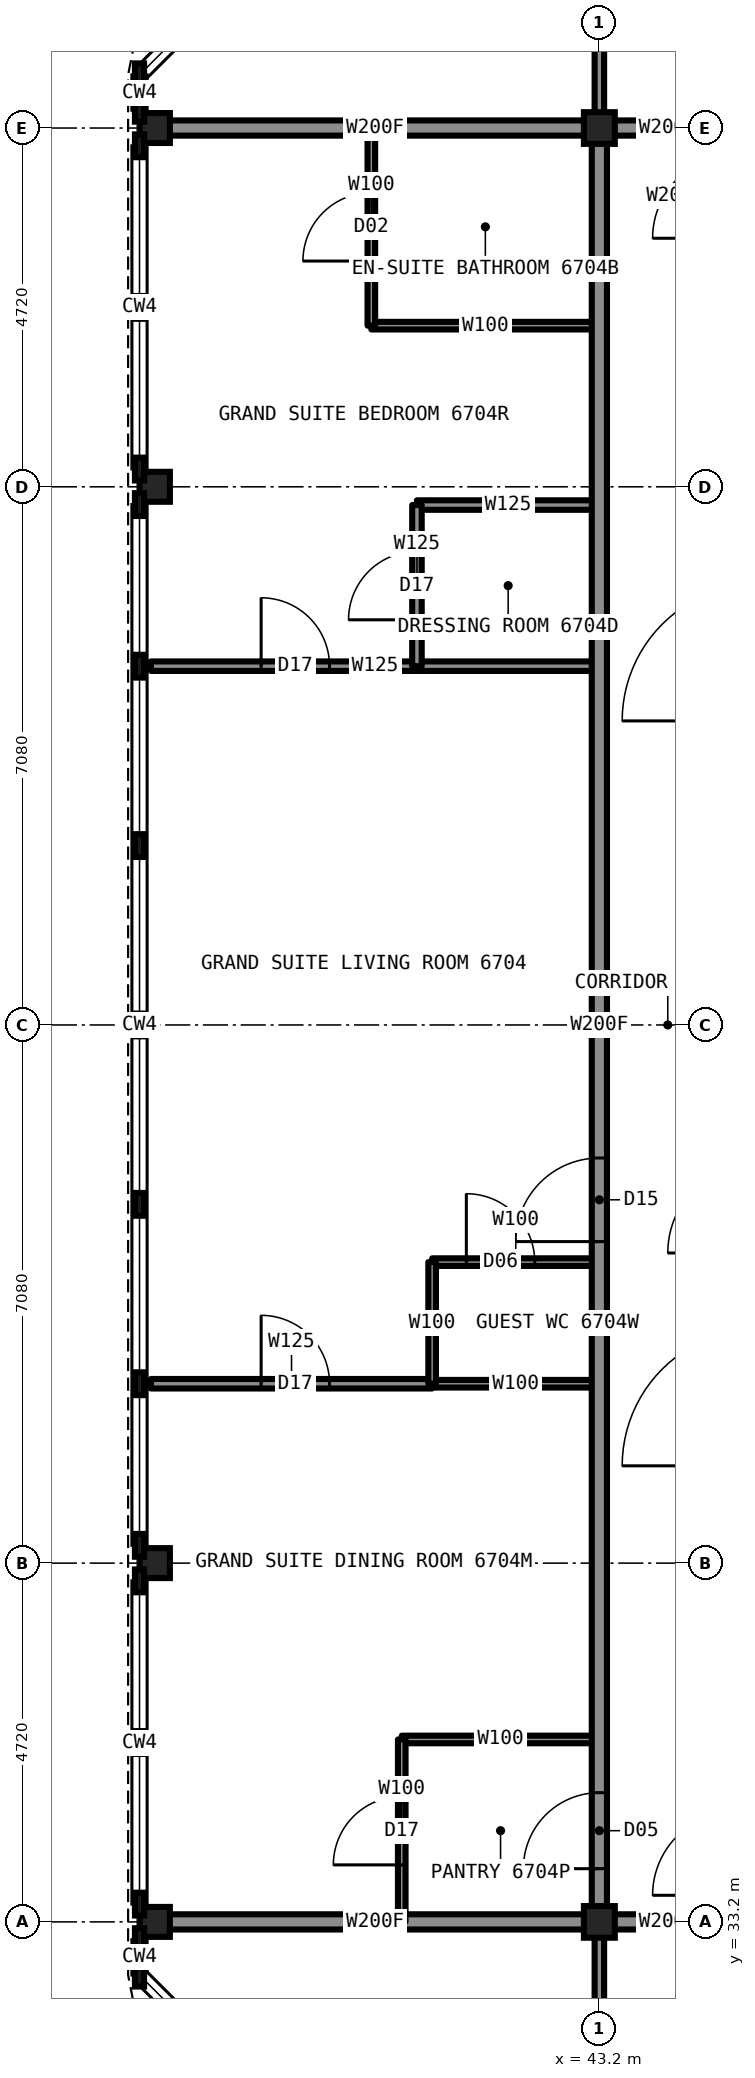
"""IFC4 building model, lengths in metres.
Left out: names, types, materials, properties, quantities, classifications, styles, units other than length and angle.
Written with IfcOpenShell. Run it as: python <this file> out.ifc"""

import sys

from ifc_helpers import new_model, si_unit, direction, frame, frame_2d, origin, origin_2d, place, context, subcontext, project, spatial, rectangle, i_section, extrude, element, fill, save


model = new_model("IFC4")
c1 = context("Model", 3, precision=1e-05, world=origin(), true_north=direction((0.0, 1.0)))
c2 = subcontext(c1, "Body", "Model", "MODEL_VIEW")
j1 = project(units=[si_unit("LENGTHUNIT", "METRE"), si_unit("PLANEANGLEUNIT", "RADIAN")], contexts=[c1])
p1 = place(None, origin())
s1 = spatial("IfcSite", under=j1, at=p1, CompositionType="ELEMENT")
p2 = place(p1, origin())
s2 = spatial("IfcBuilding", under=s1, at=p2, CompositionType="ELEMENT")
p3 = place(p2, frame((0.0, 0.0, 247.7)))
s3 = spatial("IfcBuildingStorey", under=s2, at=p3, CompositionType="ELEMENT", Elevation=247.7)
for number, where, z_axis, x_axis in (
    (1, (37.35, 33.2, 0.0), (0.0, 0.0, 1.0), (1.0, 0.0, 0.0)),
    (2, (37.35, 37.92, 0.0), (0.0, 0.0, 1.0), (1.0, 0.0, 0.0)),
    (3, (37.35, 52.08, 0.0), (0.0, 0.0, 1.0), (1.0, 0.0, 0.0)),
    (4, (37.35, 56.8, 0.0), (0.0, 0.0, 1.0), (1.0, 0.0, 0.0)),
):
    element("IfcColumn", number, at=place(p3, frame(where, z_axis=z_axis, x_axis=x_axis)), inside=s3, PredefinedType="COLUMN", context=c2, shape_type="SweptSolid", body=[
        extrude(i_section(OverallWidth=0.399, OverallDepth=0.394, WebThickness=0.023, FlangeThickness=0.037, at=origin_2d()), origin(), (0.0, 0.0, 1.0), 3.5),
    ])
for number, where, z_axis, x_axis in (
    (5, (43.2, 33.2, 0.0), (0.0, 0.0, 1.0), (1.0, 0.0, 0.0)),
    (6, (43.2, 56.8, 0.0), (0.0, 0.0, 1.0), (1.0, 0.0, 0.0)),
):
    element("IfcColumn", number, at=place(p3, frame(where, z_axis=z_axis, x_axis=x_axis)), inside=s3, PredefinedType="COLUMN", context=c2, shape_type="SweptSolid", body=[
        extrude(i_section(OverallWidth=0.406, OverallDepth=0.417, WebThickness=0.03, FlangeThickness=0.048, at=origin_2d()), origin(), (0.0, 0.0, 1.0), 3.5),
    ])
p4 = place(p3, frame((43.2, 33.2, 0.0), z_axis=(0.0, 0.0, 1.0), x_axis=(1.0, 0.0, 0.0)))
e7 = element("IfcWall", 7, at=p4, inside=s3, PredefinedType="PARTITIONING", context=c2, shape_type="SweptSolid", body=[
    extrude(rectangle(XDim=1.8, YDim=0.2, at=frame_2d((0.9, 0.0))), origin(), (0.0, 0.0, 1.0), 3.33),
])
p5 = place(p3, frame((37.3, 33.2, 0.0), z_axis=(0.0, 0.0, 1.0), x_axis=(1.0, 0.0, 0.0)))
e8 = element("IfcWall", 8, at=p5, inside=s3, PredefinedType="PARTITIONING", context=c2, shape_type="SweptSolid", body=[
    extrude(rectangle(XDim=5.9, YDim=0.2, at=frame_2d((2.95, 0.0))), origin(), (0.0, 0.0, 1.0), 2.573),
])
p6 = place(p3, frame((41.0, 41.88, 0.0), z_axis=(0.0, 0.0, 1.0), x_axis=(1.0, 0.0, 0.0)))
e9 = element("IfcWall", 9, at=p6, inside=s3, PredefinedType="PARTITIONING", context=c2, shape_type="SweptSolid", body=[
    extrude(rectangle(XDim=2.2, YDim=0.1, at=frame_2d((1.1, 0.0))), origin(), (0.0, 0.0, 1.0), 3.33),
])
p7 = place(p6, frame((0.45, 0.0, 0.0)))
e10 = element("IfcOpeningElement", 10, at=p7, cuts=e9, PredefinedType="OPENING", context=c2, shape_type="SweptSolid", body=[
    extrude(rectangle(XDim=0.9, YDim=2.1, at=frame_2d((0.45, 1.05))), frame((0.0, 0.06, 0.0), z_axis=(0.0, -1.0, 0.0), x_axis=(1.0, 0.0, 0.0)), (0.0, 0.0, 1.0), 0.12),
])
p8 = place(p3, frame((41.0, 40.28, 0.0), z_axis=(0.0, 0.0, 1.0), x_axis=(1.0, 0.0, 0.0)))
e11 = element("IfcWall", 11, at=p8, inside=s3, PredefinedType="PARTITIONING", context=c2, shape_type="SweptSolid", body=[
    extrude(rectangle(XDim=2.2, YDim=0.1, at=frame_2d((1.1, 0.0))), origin(), (0.0, 0.0, 1.0), 2.797),
])
p9 = place(p3, frame((37.3, 40.28, 0.0), z_axis=(0.0, 0.0, 1.0), x_axis=(1.0, 0.0, 0.0)))
e12 = element("IfcWall", 12, at=p9, inside=s3, PredefinedType="PARTITIONING", context=c2, shape_type="SweptSolid", body=[
    extrude(rectangle(XDim=3.7, YDim=0.125, at=frame_2d((1.85, 0.0))), origin(), (0.0, 0.0, 1.0), 2.797),
])
p10 = place(p9, frame((1.45, 0.0, 0.0)))
e13 = element("IfcOpeningElement", 13, at=p10, cuts=e12, PredefinedType="OPENING", context=c2, shape_type="SweptSolid", body=[
    extrude(rectangle(XDim=0.9, YDim=2.2, at=frame_2d((0.45, 1.1))), frame((0.0, 0.073, 0.0), z_axis=(0.0, -1.0, 0.0), x_axis=(1.0, 0.0, 0.0)), (0.0, 0.0, 1.0), 0.145),
])
p11 = place(p3, frame((40.6, 35.6, 0.0), z_axis=(0.0, 0.0, 1.0), x_axis=(1.0, 0.0, 0.0)))
e14 = element("IfcWall", 14, at=p11, inside=s3, PredefinedType="PARTITIONING", context=c2, shape_type="SweptSolid", body=[
    extrude(rectangle(XDim=2.6, YDim=0.1, at=frame_2d((1.3, 0.0))), origin(), (0.0, 0.0, 1.0), 2.797),
])
p12 = place(p3, frame((43.2, 56.8, 0.0), z_axis=(0.0, 0.0, 1.0), x_axis=(1.0, 0.0, 0.0)))
e15 = element("IfcWall", 15, at=p12, inside=s3, PredefinedType="PARTITIONING", context=c2, shape_type="SweptSolid", body=[
    extrude(rectangle(XDim=1.8, YDim=0.2, at=frame_2d((0.9, 0.0))), origin(), (0.0, 0.0, 1.0), 3.33),
])
p13 = place(p3, frame((37.3, 56.8, 0.0), z_axis=(0.0, 0.0, 1.0), x_axis=(1.0, 0.0, 0.0)))
e16 = element("IfcWall", 16, at=p13, inside=s3, PredefinedType="PARTITIONING", context=c2, shape_type="SweptSolid", body=[
    extrude(rectangle(XDim=5.9, YDim=0.2, at=frame_2d((2.95, 0.0))), origin(), (0.0, 0.0, 1.0), 2.573),
])
p14 = place(p3, frame((37.3, 49.72, 0.0), z_axis=(0.0, 0.0, 1.0), x_axis=(1.0, 0.0, 0.0)))
e17 = element("IfcWall", 17, at=p14, inside=s3, PredefinedType="PARTITIONING", context=c2, shape_type="SweptSolid", body=[
    extrude(rectangle(XDim=5.9, YDim=0.125, at=frame_2d((2.95, 0.0))), origin(), (0.0, 0.0, 1.0), 2.797),
])
p15 = place(p14, frame((1.45, 0.0, 0.0)))
e18 = element("IfcOpeningElement", 18, at=p15, cuts=e17, PredefinedType="OPENING", context=c2, shape_type="SweptSolid", body=[
    extrude(rectangle(XDim=0.9, YDim=2.2, at=frame_2d((0.45, 1.1))), frame((0.0, 0.073, 0.0), z_axis=(0.0, -1.0, 0.0), x_axis=(1.0, 0.0, 0.0)), (0.0, 0.0, 1.0), 0.145),
])
p16 = place(p3, frame((40.8, 51.84, 0.0), z_axis=(0.0, 0.0, 1.0), x_axis=(1.0, 0.0, 0.0)))
e19 = element("IfcWall", 19, at=p16, inside=s3, PredefinedType="PARTITIONING", context=c2, shape_type="SweptSolid", body=[
    extrude(rectangle(XDim=2.4, YDim=0.125, at=frame_2d((1.2, 0.0))), origin(), (0.0, 0.0, 1.0), 3.33),
])
p17 = place(p3, frame((40.2, 54.2, 0.0), z_axis=(0.0, 0.0, 1.0), x_axis=(1.0, 0.0, 0.0)))
e20 = element("IfcWall", 20, at=p17, inside=s3, PredefinedType="PARTITIONING", context=c2, shape_type="SweptSolid", body=[
    extrude(rectangle(XDim=3.0, YDim=0.1, at=frame_2d((1.5, 0.0))), origin(), (0.0, 0.0, 1.0), 3.33),
])
p18 = place(p3, frame((43.2, 33.2, 0.0), z_axis=(0.0, 0.0, 1.0), x_axis=(0.0, 1.0, 0.0)))
e21 = element("IfcWall", 21, at=p18, inside=s3, PredefinedType="PARTITIONING", context=c2, shape_type="SweptSolid", body=[
    extrude(rectangle(XDim=23.6, YDim=0.2, at=frame_2d((11.8, 0.0))), origin(), (0.0, 0.0, 1.0), 3.33),
])
p19 = place(p18, frame((8.95, 0.0, 0.0)))
e22 = element("IfcOpeningElement", 22, at=p19, cuts=e21, PredefinedType="OPENING", context=c2, shape_type="SweptSolid", body=[
    extrude(rectangle(XDim=1.1, YDim=2.2, at=frame_2d((0.55, 1.1))), frame((0.0, 0.11, 0.0), z_axis=(0.0, -1.0, 0.0), x_axis=(1.0, 0.0, 0.0)), (0.0, 0.0, 1.0), 0.22),
])
p20 = place(p18, frame((0.7, 0.0, 0.0)))
e23 = element("IfcOpeningElement", 23, at=p20, cuts=e21, PredefinedType="OPENING", context=c2, shape_type="SweptSolid", body=[
    extrude(rectangle(XDim=1.0, YDim=2.1, at=frame_2d((0.5, 1.05))), frame((0.0, 0.11, 0.0), z_axis=(0.0, -1.0, 0.0), x_axis=(1.0, 0.0, 0.0)), (0.0, 0.0, 1.0), 0.22),
])
p21 = place(p3, frame((43.2, 27.3, 0.0), z_axis=(0.0, 0.0, 1.0), x_axis=(0.0, 1.0, 0.0)))
e24 = element("IfcWall", 24, at=p21, inside=s3, PredefinedType="PARTITIONING", context=c2, shape_type="SweptSolid", body=[
    extrude(rectangle(XDim=5.9, YDim=0.125, at=frame_2d((2.95, 0.0))), origin(), (0.0, 0.0, 1.0), 2.573),
])
p22 = place(p21, frame((1.45, 0.0, 0.0)))
e25 = element("IfcOpeningElement", 25, at=p22, cuts=e24, PredefinedType="OPENING", context=c2, shape_type="SweptSolid", body=[
    extrude(rectangle(XDim=0.9, YDim=2.2, at=frame_2d((0.45, 1.1))), frame((0.0, 0.073, 0.0), z_axis=(0.0, -1.0, 0.0), x_axis=(1.0, 0.0, 0.0)), (0.0, 0.0, 1.0), 0.145),
])
p23 = place(p3, frame((43.2, 56.8, 0.0), z_axis=(0.0, 0.0, 1.0), x_axis=(0.0, 1.0, 0.0)))
e26 = element("IfcWall", 26, at=p23, inside=s3, PredefinedType="PARTITIONING", context=c2, shape_type="SweptSolid", body=[
    extrude(rectangle(XDim=5.9, YDim=0.125, at=frame_2d((2.95, 0.0))), origin(), (0.0, 0.0, 1.0), 2.573),
])
p24 = place(p23, frame((3.55, 0.0, 0.0)))
e27 = element("IfcOpeningElement", 27, at=p24, cuts=e26, PredefinedType="OPENING", context=c2, shape_type="SweptSolid", body=[
    extrude(rectangle(XDim=0.9, YDim=2.2, at=frame_2d((0.45, 1.1))), frame((0.0, 0.073, 0.0), z_axis=(0.0, -1.0, 0.0), x_axis=(1.0, 0.0, 0.0)), (0.0, 0.0, 1.0), 0.145),
])
p25 = place(p3, frame((41.0, 40.28, 0.0), z_axis=(0.0, 0.0, 1.0), x_axis=(0.0, 1.0, 0.0)))
e28 = element("IfcWall", 28, at=p25, inside=s3, PredefinedType="PARTITIONING", context=c2, shape_type="SweptSolid", body=[
    extrude(rectangle(XDim=1.6, YDim=0.1, at=frame_2d((0.8, 0.0))), origin(), (0.0, 0.0, 1.0), 3.33),
])
p26 = place(p3, frame((40.8, 49.72, 0.0), z_axis=(0.0, 0.0, 1.0), x_axis=(0.0, 1.0, 0.0)))
e29 = element("IfcWall", 29, at=p26, inside=s3, PredefinedType="PARTITIONING", context=c2, shape_type="SweptSolid", body=[
    extrude(rectangle(XDim=2.12, YDim=0.125, at=frame_2d((1.06, 0.0))), origin(), (0.0, 0.0, 1.0), 3.33),
])
p27 = place(p26, frame((0.61, 0.0, 0.0)))
e30 = element("IfcOpeningElement", 30, at=p27, cuts=e29, PredefinedType="OPENING", context=c2, shape_type="SweptSolid", body=[
    extrude(rectangle(XDim=0.9, YDim=2.2, at=frame_2d((0.45, 1.1))), frame((0.0, 0.073, 0.0), z_axis=(0.0, -1.0, 0.0), x_axis=(1.0, 0.0, 0.0)), (0.0, 0.0, 1.0), 0.145),
])
p28 = place(p3, frame((40.6, 33.2, 0.0), z_axis=(0.0, 0.0, 1.0), x_axis=(0.0, 1.0, 0.0)))
e31 = element("IfcWall", 31, at=p28, inside=s3, PredefinedType="PARTITIONING", context=c2, shape_type="SweptSolid", body=[
    extrude(rectangle(XDim=2.4, YDim=0.1, at=frame_2d((1.2, 0.0))), origin(), (0.0, 0.0, 1.0), 3.33),
])
p29 = place(p28, frame((0.75, 0.0, 0.0)))
e32 = element("IfcOpeningElement", 32, at=p29, cuts=e31, PredefinedType="OPENING", context=c2, shape_type="SweptSolid", body=[
    extrude(rectangle(XDim=0.9, YDim=2.2, at=frame_2d((0.45, 1.1))), frame((0.0, 0.06, 0.0), z_axis=(0.0, -1.0, 0.0), x_axis=(1.0, 0.0, 0.0)), (0.0, 0.0, 1.0), 0.12),
])
p30 = place(p3, frame((40.2, 54.2, 0.0), z_axis=(0.0, 0.0, 1.0), x_axis=(0.0, 1.0, 0.0)))
e33 = element("IfcWall", 33, at=p30, inside=s3, PredefinedType="PARTITIONING", context=c2, shape_type="SweptSolid", body=[
    extrude(rectangle(XDim=2.6, YDim=0.1, at=frame_2d((1.3, 0.0))), origin(), (0.0, 0.0, 1.0), 3.33),
])
p31 = place(p30, frame((0.85, 0.0, 0.0)))
e34 = element("IfcOpeningElement", 34, at=p31, cuts=e33, PredefinedType="OPENING", context=c2, shape_type="SweptSolid", body=[
    extrude(rectangle(XDim=0.9, YDim=2.1, at=frame_2d((0.45, 1.05))), frame((0.0, 0.06, 0.0), z_axis=(0.0, -1.0, 0.0), x_axis=(1.0, 0.0, 0.0)), (0.0, 0.0, 1.0), 0.12),
])
p32 = place(p19, origin())
e35 = element("IfcDoor", 35, at=p32, inside=s3, OperationType="SINGLE_SWING_LEFT", PredefinedType="DOOR", context=c2, shape_type="SweptSolid", body=[
    extrude(rectangle(XDim=1.1, YDim=2.2, at=frame_2d((0.55, 1.1))), frame((0.0, 0.025, 0.0), z_axis=(0.0, -1.0, 0.0), x_axis=(1.0, 0.0, 0.0)), (0.0, 0.0, 1.0), 0.05),
])
fill(e22, e35)
p33 = place(p31, origin())
e36 = element("IfcDoor", 36, at=p33, inside=s3, OperationType="SINGLE_SWING_RIGHT", PredefinedType="DOOR", context=c2, shape_type="SweptSolid", body=[
    extrude(rectangle(XDim=0.9, YDim=2.1, at=frame_2d((0.45, 1.05))), frame((0.0, 0.025, 0.0), z_axis=(0.0, -1.0, 0.0), x_axis=(1.0, 0.0, 0.0)), (0.0, 0.0, 1.0), 0.05),
])
fill(e34, e36)
p34 = place(p27, origin())
e37 = element("IfcDoor", 37, at=p34, inside=s3, OperationType="SINGLE_SWING_LEFT", PredefinedType="DOOR", context=c2, shape_type="SweptSolid", body=[
    extrude(rectangle(XDim=0.9, YDim=2.2, at=frame_2d((0.45, 1.1))), frame((0.0, 0.025, 0.0), z_axis=(0.0, -1.0, 0.0), x_axis=(1.0, 0.0, 0.0)), (0.0, 0.0, 1.0), 0.05),
])
fill(e30, e37)
p35 = place(p10, origin())
e38 = element("IfcDoor", 38, at=p35, inside=s3, OperationType="SINGLE_SWING_LEFT", PredefinedType="DOOR", context=c2, shape_type="SweptSolid", body=[
    extrude(rectangle(XDim=0.9, YDim=2.2, at=frame_2d((0.45, 1.1))), frame((0.0, 0.025, 0.0), z_axis=(0.0, -1.0, 0.0), x_axis=(1.0, 0.0, 0.0)), (0.0, 0.0, 1.0), 0.05),
])
fill(e13, e38)
p36 = place(p29, origin())
e39 = element("IfcDoor", 39, at=p36, inside=s3, OperationType="SINGLE_SWING_LEFT", PredefinedType="DOOR", context=c2, shape_type="SweptSolid", body=[
    extrude(rectangle(XDim=0.9, YDim=2.2, at=frame_2d((0.45, 1.1))), frame((0.0, 0.025, 0.0), z_axis=(0.0, -1.0, 0.0), x_axis=(1.0, 0.0, 0.0)), (0.0, 0.0, 1.0), 0.05),
])
fill(e32, e39)
p37 = place(p20, origin())
e40 = element("IfcDoor", 40, at=p37, inside=s3, OperationType="SINGLE_SWING_LEFT", PredefinedType="DOOR", context=c2, shape_type="SweptSolid", body=[
    extrude(rectangle(XDim=1.0, YDim=2.1, at=frame_2d((0.5, 1.05))), frame((0.0, 0.025, 0.0), z_axis=(0.0, -1.0, 0.0), x_axis=(1.0, 0.0, 0.0)), (0.0, 0.0, 1.0), 0.05),
])
fill(e23, e40)
p38 = place(p15, origin())
e41 = element("IfcDoor", 41, at=p38, inside=s3, OperationType="SINGLE_SWING_LEFT", PredefinedType="DOOR", context=c2, shape_type="SweptSolid", body=[
    extrude(rectangle(XDim=0.9, YDim=2.2, at=frame_2d((0.45, 1.1))), frame((0.0, 0.025, 0.0), z_axis=(0.0, -1.0, 0.0), x_axis=(1.0, 0.0, 0.0)), (0.0, 0.0, 1.0), 0.05),
])
fill(e18, e41)
p39 = place(p7, origin())
e42 = element("IfcDoor", 42, at=p39, inside=s3, OperationType="SINGLE_SWING_LEFT", PredefinedType="DOOR", context=c2, shape_type="SweptSolid", body=[
    extrude(rectangle(XDim=0.9, YDim=2.1, at=frame_2d((0.45, 1.05))), frame((0.0, 0.025, 0.0), z_axis=(0.0, -1.0, 0.0), x_axis=(1.0, 0.0, 0.0)), (0.0, 0.0, 1.0), 0.05),
])
fill(e10, e42)
save(model, sys.argv[1])
